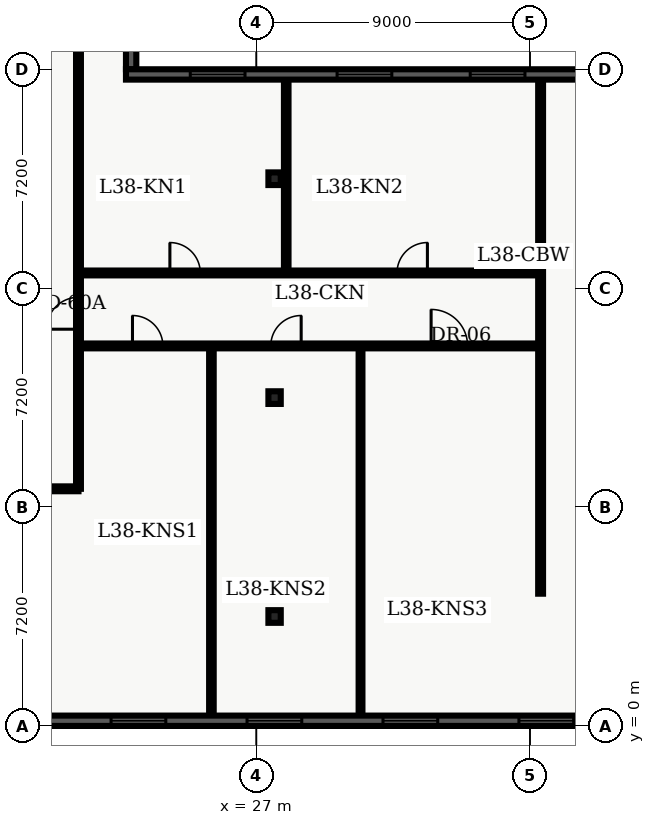
"""IFC4 building model, lengths in metres.
Left out: names, types, materials, properties, quantities, classifications, styles, units other than length and angle.
Written with IfcOpenShell. Run it as: python <this file> out.ifc"""

import sys

from ifc_helpers import new_model, entity, si_unit, converted_unit, direction, frame, origin_with_axes, origin_2d_with_axis, place, context, subcontext, project, spatial, polyline, rectangle, i_section, outline, extrude, element, fill, save


model = new_model("IFC4")
c1 = context("Model", 3, precision=1e-05, world=origin_with_axes(), true_north=direction((0.0, 1.0)))
c2 = subcontext(c1, "Body", "Model", "MODEL_VIEW")
j1 = project(units=[si_unit("LENGTHUNIT", "METRE"), converted_unit("PLANEANGLEUNIT", "DEGREE", entity("IfcPlaneAngleMeasure", 0.017), si_unit("PLANEANGLEUNIT", "RADIAN"), dimensions=[0, 0, 0, 0, 0, 0, 0])], contexts=[c1])
p1 = place(None, origin_with_axes())
s1 = spatial("IfcSite", under=j1, at=p1, CompositionType="ELEMENT")
p2 = place(p1, origin_with_axes())
s2 = spatial("IfcBuilding", under=s1, at=p2, CompositionType="ELEMENT")
p3 = place(p2, frame((0.0, 0.0, 156.3), z_axis=(0.0, 0.0, 1.0), x_axis=(1.0, 0.0, 0.0)))
s3 = spatial("IfcBuildingStorey", under=s2, at=p3, CompositionType="ELEMENT", Elevation=156.3)
for number, where, z_axis, x_axis in (
    (1, (27.6, 3.6, 0.0), (0.0, 0.0, 1.0), (1.0, 0.0, 0.0)),
    (2, (27.6, 10.8, 0.0), (0.0, 0.0, 1.0), (1.0, 0.0, 0.0)),
    (3, (27.6, 18.0, 0.0), (0.0, 0.0, 1.0), (1.0, 0.0, 0.0)),
):
    element("IfcColumn", number, at=place(p3, frame(where, z_axis=z_axis, x_axis=x_axis)), inside=s3, PredefinedType="COLUMN", context=c2, shape_type="SweptSolid", body=[
        extrude(i_section(OverallWidth=0.406, OverallDepth=0.416, WebThickness=0.03, FlangeThickness=0.048, FilletRadius=0.022, at=origin_2d_with_axis()), origin_with_axes(), (0.0, 0.0, 1.0), 3.9),
    ])
p4 = place(p3, frame((2.6, 7.8, 0.0), z_axis=(0.0, 0.0, 1.0), x_axis=(1.0, 0.0, 0.0)))
e4 = element("IfcWall", 4, at=p4, inside=s3, PredefinedType="PARTITIONING", context=c2, shape_type="SweptSolid", body=[
    extrude(outline(polyline([(0.0, -0.08), (18.55, -0.08), (18.55, 0.08), (0.0, 0.08), (0.0, -0.08)])), origin_with_axes(), (0.0, 0.0, 1.0), 2.7),
])
p5 = place(p4, frame((3.737, 0.0, 0.0), z_axis=(0.0, 0.0, 1.0), x_axis=(1.0, 0.0, 0.0)))
e5 = element("IfcOpeningElement", 5, at=p5, cuts=e4, PredefinedType="OPENING", context=c2, shape_type="SweptSolid", body=[
    extrude(rectangle(XDim=1.0, YDim=0.18, at=origin_2d_with_axis()), origin_with_axes(), (0.0, 0.0, 1.0), 2.15),
])
p6 = place(p4, frame((13.273, 0.0, 0.0), z_axis=(0.0, 0.0, 1.0), x_axis=(1.0, 0.0, 0.0)))
e6 = element("IfcOpeningElement", 6, at=p6, cuts=e4, PredefinedType="OPENING", context=c2, shape_type="SweptSolid", body=[
    extrude(rectangle(XDim=1.0, YDim=0.18, at=origin_2d_with_axis()), origin_with_axes(), (0.0, 0.0, 1.0), 2.15),
])
p7 = place(p3, frame((21.15, 7.8, 0.0), z_axis=(0.0, 0.0, 1.0), x_axis=(0.0, 1.0, 0.0)))
e7 = element("IfcWall", 7, at=p7, inside=s3, PredefinedType="PARTITIONING", context=c2, shape_type="SweptSolid", body=[
    extrude(outline(polyline([(0.0, -0.08), (32.7, -0.08), (32.7, 0.08), (0.0, 0.08), (0.0, -0.08)])), origin_with_axes(), (0.0, 0.0, 1.0), 2.7),
])
p8 = place(p7, frame((5.775, 0.0, 0.0), z_axis=(0.0, 0.0, 1.0), x_axis=(1.0, 0.0, 0.0)))
e8 = element("IfcOpeningElement", 8, at=p8, cuts=e7, PredefinedType="OPENING", context=c2, shape_type="SweptSolid", body=[
    extrude(rectangle(XDim=1.05, YDim=0.18, at=origin_2d_with_axis()), origin_with_axes(), (0.0, 0.0, 1.0), 2.15),
])
p9 = place(p3, frame((21.15, 12.5, 0.0), z_axis=(0.0, 0.0, 1.0), x_axis=(1.0, 0.0, 0.0)))
e9 = element("IfcWall", 9, at=p9, inside=s3, PredefinedType="PARTITIONING", context=c2, shape_type="SweptSolid", body=[
    extrude(outline(polyline([(0.0, -0.08), (15.2, -0.08), (15.2, 0.08), (0.0, 0.08), (0.0, -0.08)])), origin_with_axes(), (0.0, 0.0, 1.0), 2.7),
])
p10 = place(p9, frame((2.276, 0.0, 0.0), z_axis=(0.0, 0.0, 1.0), x_axis=(1.0, 0.0, 0.0)))
e10 = element("IfcOpeningElement", 10, at=p10, cuts=e9, PredefinedType="OPENING", context=c2, shape_type="SweptSolid", body=[
    extrude(rectangle(XDim=1.0, YDim=0.18, at=origin_2d_with_axis()), origin_with_axes(), (0.0, 0.0, 1.0), 2.15),
])
p11 = place(p9, frame((6.824, 0.0, 0.0), z_axis=(0.0, 0.0, 1.0), x_axis=(1.0, 0.0, 0.0)))
e11 = element("IfcOpeningElement", 11, at=p11, cuts=e9, PredefinedType="OPENING", context=c2, shape_type="SweptSolid", body=[
    extrude(rectangle(XDim=1.0, YDim=0.18, at=origin_2d_with_axis()), origin_with_axes(), (0.0, 0.0, 1.0), 2.15),
])
p12 = place(p9, frame((12.198, 0.0, 0.0), z_axis=(0.0, 0.0, 1.0), x_axis=(1.0, 0.0, 0.0)))
e12 = element("IfcOpeningElement", 12, at=p12, cuts=e9, PredefinedType="OPENING", context=c2, shape_type="SweptSolid", body=[
    extrude(rectangle(XDim=1.2, YDim=0.18, at=origin_2d_with_axis()), origin_with_axes(), (0.0, 0.0, 1.0), 2.2),
])
p13 = place(p3, frame((21.15, 14.9, 0.0), z_axis=(0.0, 0.0, 1.0), x_axis=(1.0, 0.0, 0.0)))
e13 = element("IfcWall", 13, at=p13, inside=s3, PredefinedType="PARTITIONING", context=c2, shape_type="SweptSolid", body=[
    extrude(outline(polyline([(0.0, -0.08), (15.2, -0.08), (15.2, 0.08), (0.0, 0.08), (0.0, -0.08)])), origin_with_axes(), (0.0, 0.0, 1.0), 2.7),
])
p14 = place(p13, frame((3.506, 0.0, 0.0), z_axis=(0.0, 0.0, 1.0), x_axis=(1.0, 0.0, 0.0)))
e14 = element("IfcOpeningElement", 14, at=p14, cuts=e13, PredefinedType="OPENING", context=c2, shape_type="SweptSolid", body=[
    extrude(rectangle(XDim=1.0, YDim=0.18, at=origin_2d_with_axis()), origin_with_axes(), (0.0, 0.0, 1.0), 2.15),
])
p15 = place(p13, frame((10.976, 0.0, 0.0), z_axis=(0.0, 0.0, 1.0), x_axis=(1.0, 0.0, 0.0)))
e15 = element("IfcOpeningElement", 15, at=p15, cuts=e13, PredefinedType="OPENING", context=c2, shape_type="SweptSolid", body=[
    extrude(rectangle(XDim=1.0, YDim=0.18, at=origin_2d_with_axis()), origin_with_axes(), (0.0, 0.0, 1.0), 2.15),
])
p16 = place(p3, frame((36.35, 4.35, 0.0), z_axis=(0.0, 0.0, 1.0), x_axis=(0.0, 1.0, 0.0)))
e16 = element("IfcWall", 16, at=p16, inside=s3, PredefinedType="PARTITIONING", context=c2, shape_type="SweptSolid", body=[
    extrude(outline(polyline([(0.0, -0.08), (16.95, -0.08), (16.95, 0.08), (0.0, 0.08), (0.0, -0.08)])), origin_with_axes(), (0.0, 0.0, 1.0), 2.7),
])
p17 = place(p3, frame((25.522, 0.335, 0.0), z_axis=(0.0, 0.0, 1.0), x_axis=(0.0, 1.0, 0.0)))
e17 = element("IfcWall", 17, at=p17, inside=s3, PredefinedType="PARTITIONING", context=c2, shape_type="SweptSolid", body=[
    extrude(outline(polyline([(0.0, -0.075), (12.045, -0.075), (12.045, 0.075), (0.0, 0.075), (0.0, -0.075)])), origin_with_axes(), (0.0, 0.0, 1.0), 2.7),
])
p18 = place(p3, frame((30.427, 0.335, 0.0), z_axis=(0.0, 0.0, 1.0), x_axis=(0.0, 1.0, 0.0)))
e18 = element("IfcWall", 18, at=p18, inside=s3, PredefinedType="PARTITIONING", context=c2, shape_type="SweptSolid", body=[
    extrude(outline(polyline([(0.0, -0.062), (12.045, -0.062), (12.045, 0.062), (0.0, 0.062), (0.0, -0.062)])), origin_with_axes(), (0.0, 0.0, 1.0), 2.7),
])
p19 = place(p3, frame((27.983, 15.02, 0.0), z_axis=(0.0, 0.0, 1.0), x_axis=(0.0, 1.0, 0.0)))
e19 = element("IfcWall", 19, at=p19, inside=s3, PredefinedType="PARTITIONING", context=c2, shape_type="SweptSolid", body=[
    extrude(outline(polyline([(0.0, -0.075), (6.245, -0.075), (6.245, 0.075), (0.0, 0.075), (0.0, -0.075)])), origin_with_axes(), (0.0, 0.0, 1.0), 2.7),
])
p20 = place(p3, frame((57.26, 0.17, 0.0), z_axis=(0.0, 0.0, 1.0), x_axis=(-1.0, 0.0, 0.0)))
e20 = element("IfcWall", 20, at=p20, inside=s3, PredefinedType="SOLIDWALL", context=c2, shape_type="SweptSolid", body=[
    extrude(outline(polyline([(0.0, -0.17), (54.86, -0.17), (54.86, 0.17), (0.0, 0.17), (0.0, -0.17)])), origin_with_axes(), (0.0, 0.0, 1.0), 3.66),
])
p21 = place(p20, frame((2.836, 0.0, 0.45), z_axis=(0.0, 0.0, 1.0), x_axis=(1.0, 0.0, 0.0)))
e21 = element("IfcOpeningElement", 21, at=p21, cuts=e20, PredefinedType="OPENING", context=c2, shape_type="SweptSolid", body=[
    extrude(rectangle(XDim=1.8, YDim=0.36, at=origin_2d_with_axis()), origin_with_axes(), (0.0, 0.0, 1.0), 2.1),
])
p22 = place(p20, frame((7.307, 0.0, 0.45), z_axis=(0.0, 0.0, 1.0), x_axis=(1.0, 0.0, 0.0)))
e22 = element("IfcOpeningElement", 22, at=p22, cuts=e20, PredefinedType="OPENING", context=c2, shape_type="SweptSolid", body=[
    extrude(rectangle(XDim=1.8, YDim=0.36, at=origin_2d_with_axis()), origin_with_axes(), (0.0, 0.0, 1.0), 2.1),
])
p23 = place(p20, frame((11.779, 0.0, 0.45), z_axis=(0.0, 0.0, 1.0), x_axis=(1.0, 0.0, 0.0)))
e23 = element("IfcOpeningElement", 23, at=p23, cuts=e20, PredefinedType="OPENING", context=c2, shape_type="SweptSolid", body=[
    extrude(rectangle(XDim=1.8, YDim=0.36, at=origin_2d_with_axis()), origin_with_axes(), (0.0, 0.0, 1.0), 2.1),
])
p24 = place(p20, frame((16.251, 0.0, 0.45), z_axis=(0.0, 0.0, 1.0), x_axis=(1.0, 0.0, 0.0)))
e24 = element("IfcOpeningElement", 24, at=p24, cuts=e20, PredefinedType="OPENING", context=c2, shape_type="SweptSolid", body=[
    extrude(rectangle(XDim=1.8, YDim=0.36, at=origin_2d_with_axis()), origin_with_axes(), (0.0, 0.0, 1.0), 2.1),
])
p25 = place(p20, frame((20.723, 0.0, 0.45), z_axis=(0.0, 0.0, 1.0), x_axis=(1.0, 0.0, 0.0)))
e25 = element("IfcOpeningElement", 25, at=p25, cuts=e20, PredefinedType="OPENING", context=c2, shape_type="SweptSolid", body=[
    extrude(rectangle(XDim=1.8, YDim=0.36, at=origin_2d_with_axis()), origin_with_axes(), (0.0, 0.0, 1.0), 2.1),
])
p26 = place(p20, frame((25.194, 0.0, 0.45), z_axis=(0.0, 0.0, 1.0), x_axis=(1.0, 0.0, 0.0)))
e26 = element("IfcOpeningElement", 26, at=p26, cuts=e20, PredefinedType="OPENING", context=c2, shape_type="SweptSolid", body=[
    extrude(rectangle(XDim=1.8, YDim=0.36, at=origin_2d_with_axis()), origin_with_axes(), (0.0, 0.0, 1.0), 2.1),
])
p27 = place(p20, frame((29.666, 0.0, 0.45), z_axis=(0.0, 0.0, 1.0), x_axis=(1.0, 0.0, 0.0)))
e27 = element("IfcOpeningElement", 27, at=p27, cuts=e20, PredefinedType="OPENING", context=c2, shape_type="SweptSolid", body=[
    extrude(rectangle(XDim=1.8, YDim=0.36, at=origin_2d_with_axis()), origin_with_axes(), (0.0, 0.0, 1.0), 2.1),
])
p28 = place(p20, frame((34.138, 0.0, 0.45), z_axis=(0.0, 0.0, 1.0), x_axis=(1.0, 0.0, 0.0)))
e28 = element("IfcOpeningElement", 28, at=p28, cuts=e20, PredefinedType="OPENING", context=c2, shape_type="SweptSolid", body=[
    extrude(rectangle(XDim=1.8, YDim=0.36, at=origin_2d_with_axis()), origin_with_axes(), (0.0, 0.0, 1.0), 2.1),
])
p29 = place(p20, frame((38.609, 0.0, 0.45), z_axis=(0.0, 0.0, 1.0), x_axis=(1.0, 0.0, 0.0)))
e29 = element("IfcOpeningElement", 29, at=p29, cuts=e20, PredefinedType="OPENING", context=c2, shape_type="SweptSolid", body=[
    extrude(rectangle(XDim=1.8, YDim=0.36, at=origin_2d_with_axis()), origin_with_axes(), (0.0, 0.0, 1.0), 2.1),
])
p30 = place(p20, frame((43.081, 0.0, 0.45), z_axis=(0.0, 0.0, 1.0), x_axis=(1.0, 0.0, 0.0)))
e30 = element("IfcOpeningElement", 30, at=p30, cuts=e20, PredefinedType="OPENING", context=c2, shape_type="SweptSolid", body=[
    extrude(rectangle(XDim=1.8, YDim=0.36, at=origin_2d_with_axis()), origin_with_axes(), (0.0, 0.0, 1.0), 2.1),
])
p31 = place(p20, frame((48.403, 0.0, 0.45), z_axis=(0.0, 0.0, 1.0), x_axis=(1.0, 0.0, 0.0)))
e31 = element("IfcOpeningElement", 31, at=p31, cuts=e20, PredefinedType="OPENING", context=c2, shape_type="SweptSolid", body=[
    extrude(rectangle(XDim=1.8, YDim=0.36, at=origin_2d_with_axis()), origin_with_axes(), (0.0, 0.0, 1.0), 2.1),
])
p32 = place(p20, frame((52.024, 0.0, 0.45), z_axis=(0.0, 0.0, 1.0), x_axis=(1.0, 0.0, 0.0)))
e32 = element("IfcOpeningElement", 32, at=p32, cuts=e20, PredefinedType="OPENING", context=c2, shape_type="SweptSolid", body=[
    extrude(rectangle(XDim=1.8, YDim=0.36, at=origin_2d_with_axis()), origin_with_axes(), (0.0, 0.0, 1.0), 2.1),
])
p33 = place(p3, frame((22.882, 45.98, 0.0), z_axis=(0.0, 0.0, 1.0), x_axis=(0.0, -1.0, 0.0)))
e33 = element("IfcWall", 33, at=p33, inside=s3, PredefinedType="SOLIDWALL", context=c2, shape_type="SweptSolid", body=[
    extrude(outline(polyline([(0.0, -0.17), (24.38, -0.17), (24.38, 0.17), (0.0, 0.17), (0.0, -0.17)])), origin_with_axes(), (0.0, 0.0, 1.0), 3.66),
])
p34 = place(p33, frame((2.918, 0.0, 0.45), z_axis=(0.0, 0.0, 1.0), x_axis=(1.0, 0.0, 0.0)))
e34 = element("IfcOpeningElement", 34, at=p34, cuts=e33, PredefinedType="OPENING", context=c2, shape_type="SweptSolid", body=[
    extrude(rectangle(XDim=1.6, YDim=0.36, at=origin_2d_with_axis()), origin_with_axes(), (0.0, 0.0, 1.0), 2.2),
])
p35 = place(p33, frame((7.554, 0.0, 0.45), z_axis=(0.0, 0.0, 1.0), x_axis=(1.0, 0.0, 0.0)))
e35 = element("IfcOpeningElement", 35, at=p35, cuts=e33, PredefinedType="OPENING", context=c2, shape_type="SweptSolid", body=[
    extrude(rectangle(XDim=1.6, YDim=0.36, at=origin_2d_with_axis()), origin_with_axes(), (0.0, 0.0, 1.0), 2.2),
])
p36 = place(p33, frame((12.19, 0.0, 0.45), z_axis=(0.0, 0.0, 1.0), x_axis=(1.0, 0.0, 0.0)))
e36 = element("IfcOpeningElement", 36, at=p36, cuts=e33, PredefinedType="OPENING", context=c2, shape_type="SweptSolid", body=[
    extrude(rectangle(XDim=1.6, YDim=0.36, at=origin_2d_with_axis()), origin_with_axes(), (0.0, 0.0, 1.0), 2.2),
])
p37 = place(p33, frame((16.826, 0.0, 0.45), z_axis=(0.0, 0.0, 1.0), x_axis=(1.0, 0.0, 0.0)))
e37 = element("IfcOpeningElement", 37, at=p37, cuts=e33, PredefinedType="OPENING", context=c2, shape_type="SweptSolid", body=[
    extrude(rectangle(XDim=1.6, YDim=0.36, at=origin_2d_with_axis()), origin_with_axes(), (0.0, 0.0, 1.0), 2.2),
])
p38 = place(p33, frame((21.462, 0.0, 0.45), z_axis=(0.0, 0.0, 1.0), x_axis=(1.0, 0.0, 0.0)))
e38 = element("IfcOpeningElement", 38, at=p38, cuts=e33, PredefinedType="OPENING", context=c2, shape_type="SweptSolid", body=[
    extrude(rectangle(XDim=1.6, YDim=0.36, at=origin_2d_with_axis()), origin_with_axes(), (0.0, 0.0, 1.0), 2.2),
])
p39 = place(p3, frame((22.712, 21.43, 0.0), z_axis=(0.0, 0.0, 1.0), x_axis=(1.0, 0.0, 0.0)))
e39 = element("IfcWall", 39, at=p39, inside=s3, PredefinedType="SOLIDWALL", context=c2, shape_type="SweptSolid", body=[
    extrude(outline(polyline([(0.0, -0.17), (15.688, -0.17), (15.688, 0.17), (0.0, 0.17), (0.0, -0.17)])), origin_with_axes(), (0.0, 0.0, 1.0), 3.66),
])
p40 = place(p39, frame((3.015, 0.0, 0.45), z_axis=(0.0, 0.0, 1.0), x_axis=(1.0, 0.0, 0.0)))
e40 = element("IfcOpeningElement", 40, at=p40, cuts=e39, PredefinedType="OPENING", context=c2, shape_type="SweptSolid", body=[
    extrude(rectangle(XDim=1.8, YDim=0.36, at=origin_2d_with_axis()), origin_with_axes(), (0.0, 0.0, 1.0), 2.1),
])
p41 = place(p39, frame((7.844, 0.0, 0.45), z_axis=(0.0, 0.0, 1.0), x_axis=(1.0, 0.0, 0.0)))
e41 = element("IfcOpeningElement", 41, at=p41, cuts=e39, PredefinedType="OPENING", context=c2, shape_type="SweptSolid", body=[
    extrude(rectangle(XDim=1.8, YDim=0.36, at=origin_2d_with_axis()), origin_with_axes(), (0.0, 0.0, 1.0), 2.1),
])
p42 = place(p39, frame((12.223, 0.0, 0.45), z_axis=(0.0, 0.0, 1.0), x_axis=(1.0, 0.0, 0.0)))
e42 = element("IfcOpeningElement", 42, at=p42, cuts=e39, PredefinedType="OPENING", context=c2, shape_type="SweptSolid", body=[
    extrude(rectangle(XDim=1.8, YDim=0.36, at=origin_2d_with_axis()), origin_with_axes(), (0.0, 0.0, 1.0), 2.1),
])
p43 = place(p7, frame((5.775, 0.0, 0.0), z_axis=(0.0, 0.0, 1.0), x_axis=(1.0, 0.0, 0.0)))
e43 = element("IfcDoor", 43, at=p43, inside=s3, OperationType="SINGLE_SWING_LEFT", PredefinedType="DOOR", context=c2, shape_type="SweptSolid", body=[
    extrude(rectangle(XDim=1.05, YDim=0.09, at=origin_2d_with_axis()), origin_with_axes(), (0.0, 0.0, 1.0), 2.15),
])
fill(e8, e43)
p44 = place(p9, frame((2.276, 0.0, 0.0), z_axis=(0.0, 0.0, 1.0), x_axis=(1.0, 0.0, 0.0)))
e44 = element("IfcDoor", 44, at=p44, inside=s3, OperationType="SINGLE_SWING_LEFT", PredefinedType="DOOR", context=c2, shape_type="SweptSolid", body=[
    extrude(rectangle(XDim=1.0, YDim=0.09, at=origin_2d_with_axis()), origin_with_axes(), (0.0, 0.0, 1.0), 2.15),
])
fill(e10, e44)
p45 = place(p9, frame((6.824, 0.0, 0.0), z_axis=(0.0, 0.0, 1.0), x_axis=(1.0, 0.0, 0.0)))
e45 = element("IfcDoor", 45, at=p45, inside=s3, OperationType="SINGLE_SWING_RIGHT", PredefinedType="DOOR", context=c2, shape_type="SweptSolid", body=[
    extrude(rectangle(XDim=1.0, YDim=0.09, at=origin_2d_with_axis()), origin_with_axes(), (0.0, 0.0, 1.0), 2.15),
])
fill(e11, e45)
p46 = place(p9, frame((12.198, 0.0, 0.0), z_axis=(0.0, 0.0, 1.0), x_axis=(1.0, 0.0, 0.0)))
e46 = element("IfcDoor", 46, at=p46, inside=s3, OperationType="SINGLE_SWING_LEFT", PredefinedType="DOOR", context=c2, shape_type="SweptSolid", body=[
    extrude(rectangle(XDim=1.2, YDim=0.09, at=origin_2d_with_axis()), origin_with_axes(), (0.0, 0.0, 1.0), 2.2),
])
fill(e12, e46)
p47 = place(p13, frame((3.506, 0.0, 0.0), z_axis=(0.0, 0.0, 1.0), x_axis=(1.0, 0.0, 0.0)))
e47 = element("IfcDoor", 47, at=p47, inside=s3, OperationType="SINGLE_SWING_LEFT", PredefinedType="DOOR", context=c2, shape_type="SweptSolid", body=[
    extrude(rectangle(XDim=1.0, YDim=0.09, at=origin_2d_with_axis()), origin_with_axes(), (0.0, 0.0, 1.0), 2.15),
])
fill(e14, e47)
p48 = place(p13, frame((10.976, 0.0, 0.0), z_axis=(0.0, 0.0, 1.0), x_axis=(1.0, 0.0, 0.0)))
e48 = element("IfcDoor", 48, at=p48, inside=s3, OperationType="SINGLE_SWING_RIGHT", PredefinedType="DOOR", context=c2, shape_type="SweptSolid", body=[
    extrude(rectangle(XDim=1.0, YDim=0.09, at=origin_2d_with_axis()), origin_with_axes(), (0.0, 0.0, 1.0), 2.15),
])
fill(e15, e48)
p49 = place(p20, frame((20.723, 0.0, 0.45), z_axis=(0.0, 0.0, 1.0), x_axis=(1.0, 0.0, 0.0)))
e49 = element("IfcWindow", 49, at=p49, inside=s3, PredefinedType="WINDOW", context=c2, shape_type="SweptSolid", body=[
    extrude(rectangle(XDim=1.8, YDim=0.09, at=origin_2d_with_axis()), origin_with_axes(), (0.0, 0.0, 1.0), 2.1),
])
fill(e25, e49)
p50 = place(p20, frame((25.194, 0.0, 0.45), z_axis=(0.0, 0.0, 1.0), x_axis=(1.0, 0.0, 0.0)))
e50 = element("IfcWindow", 50, at=p50, inside=s3, PredefinedType="WINDOW", context=c2, shape_type="SweptSolid", body=[
    extrude(rectangle(XDim=1.8, YDim=0.09, at=origin_2d_with_axis()), origin_with_axes(), (0.0, 0.0, 1.0), 2.1),
])
fill(e26, e50)
p51 = place(p20, frame((29.666, 0.0, 0.45), z_axis=(0.0, 0.0, 1.0), x_axis=(1.0, 0.0, 0.0)))
e51 = element("IfcWindow", 51, at=p51, inside=s3, PredefinedType="WINDOW", context=c2, shape_type="SweptSolid", body=[
    extrude(rectangle(XDim=1.8, YDim=0.09, at=origin_2d_with_axis()), origin_with_axes(), (0.0, 0.0, 1.0), 2.1),
])
fill(e27, e51)
p52 = place(p20, frame((34.138, 0.0, 0.45), z_axis=(0.0, 0.0, 1.0), x_axis=(1.0, 0.0, 0.0)))
e52 = element("IfcWindow", 52, at=p52, inside=s3, PredefinedType="WINDOW", context=c2, shape_type="SweptSolid", body=[
    extrude(rectangle(XDim=1.8, YDim=0.09, at=origin_2d_with_axis()), origin_with_axes(), (0.0, 0.0, 1.0), 2.1),
])
fill(e28, e52)
p53 = place(p39, frame((3.015, 0.0, 0.45), z_axis=(0.0, 0.0, 1.0), x_axis=(1.0, 0.0, 0.0)))
e53 = element("IfcWindow", 53, at=p53, inside=s3, PredefinedType="WINDOW", context=c2, shape_type="SweptSolid", body=[
    extrude(rectangle(XDim=1.8, YDim=0.09, at=origin_2d_with_axis()), origin_with_axes(), (0.0, 0.0, 1.0), 2.1),
])
fill(e40, e53)
p54 = place(p39, frame((7.844, 0.0, 0.45), z_axis=(0.0, 0.0, 1.0), x_axis=(1.0, 0.0, 0.0)))
e54 = element("IfcWindow", 54, at=p54, inside=s3, PredefinedType="WINDOW", context=c2, shape_type="SweptSolid", body=[
    extrude(rectangle(XDim=1.8, YDim=0.09, at=origin_2d_with_axis()), origin_with_axes(), (0.0, 0.0, 1.0), 2.1),
])
fill(e41, e54)
p55 = place(p39, frame((12.223, 0.0, 0.45), z_axis=(0.0, 0.0, 1.0), x_axis=(1.0, 0.0, 0.0)))
e55 = element("IfcWindow", 55, at=p55, inside=s3, PredefinedType="WINDOW", context=c2, shape_type="SweptSolid", body=[
    extrude(rectangle(XDim=1.8, YDim=0.09, at=origin_2d_with_axis()), origin_with_axes(), (0.0, 0.0, 1.0), 2.1),
])
fill(e42, e55)
save(model, sys.argv[1])
